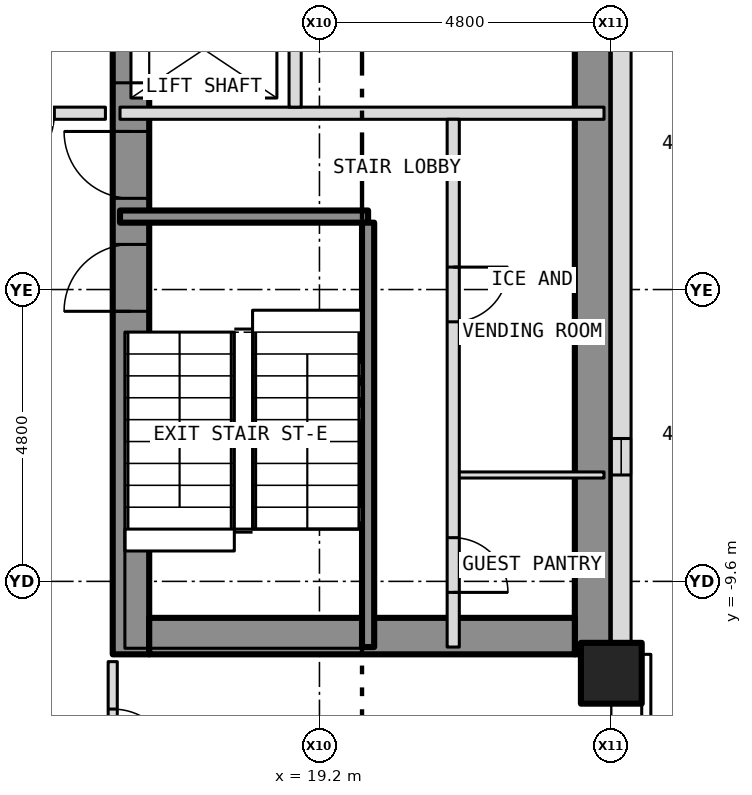
"""IFC4 building model, lengths in metres.
Left out: names, types, materials, properties, quantities, classifications, styles, units other than length and angle.
Written with IfcOpenShell. Run it as: python <this file> out.ifc"""

import sys

from ifc_helpers import new_model, si_unit, direction, frame, frame_2d, origin, origin_2d, place, context, subcontext, project, spatial, rectangle, hollow_rectangle, extrude, element, fill, save


model = new_model("IFC4")
c1 = context("Model", 3, precision=1e-05, world=origin(), true_north=direction((0.0, 1.0)))
c2 = subcontext(c1, "Body", "Model", "MODEL_VIEW")
j1 = project(units=[si_unit("LENGTHUNIT", "METRE"), si_unit("PLANEANGLEUNIT", "RADIAN")], contexts=[c1])
p1 = place(None, origin())
s1 = spatial("IfcSite", under=j1, at=p1, CompositionType="ELEMENT")
p2 = place(p1, origin())
s2 = spatial("IfcBuilding", under=s1, at=p2, CompositionType="ELEMENT")
p3 = place(p2, frame((0.0, 0.0, 42.5)))
s3 = spatial("IfcBuildingStorey", under=s2, at=p3, CompositionType="ELEMENT", Elevation=42.5)
p4 = place(p3, frame((24.0, -11.111, -0.15), z_axis=(0.0, 0.0, 1.0), x_axis=(1.0, 0.0, 0.0)))
e1 = element("IfcColumn", 1, at=p4, inside=s3, PredefinedType="COLUMN", context=c2, shape_type="SweptSolid", body=[
    extrude(hollow_rectangle(XDim=1.0, YDim=1.0, WallThickness=0.06, at=origin_2d()), origin(), (0.0, 0.0, 1.0), 3.5),
])
p5 = place(p3, frame((16.1, -10.8, 0.0), z_axis=(0.0, 0.0, 1.0), x_axis=(0.0, 1.0, 0.0)))
e2 = element("IfcWall", 2, at=p5, inside=s3, PredefinedType="SHEAR", context=c2, shape_type="SweptSolid", body=[
    extrude(rectangle(XDim=21.6, YDim=0.6, at=frame_2d((10.8, 0.0))), origin(), (0.0, 0.0, 1.0), 3.25),
])
p6 = place(p5, frame((9.4, 0.0, 0.0)))
e3 = element("IfcOpeningElement", 3, at=p6, cuts=e2, PredefinedType="OPENING", context=c2, shape_type="SweptSolid", body=[
    extrude(rectangle(XDim=1.1, YDim=2.1, at=frame_2d((0.55, 1.05))), frame((0.0, 0.312, 0.0), z_axis=(0.0, -1.0, 0.0), x_axis=(1.0, 0.0, 0.0)), (0.0, 0.0, 1.0), 0.624),
])
p7 = place(p5, frame((11.5, 0.0, 0.0)))
e4 = element("IfcOpeningElement", 4, at=p7, cuts=e2, PredefinedType="OPENING", context=c2, shape_type="SweptSolid", body=[
    extrude(rectangle(XDim=1.1, YDim=2.1, at=frame_2d((0.55, 1.05))), frame((0.0, 0.312, 0.0), z_axis=(0.0, -1.0, 0.0), x_axis=(1.0, 0.0, 0.0)), (0.0, 0.0, 1.0), 0.624),
])
p8 = place(p5, frame((13.6, 0.0, 0.0)))
e5 = element("IfcOpeningElement", 5, at=p8, cuts=e2, PredefinedType="OPENING", context=c2, shape_type="SweptSolid", body=[
    extrude(rectangle(XDim=1.1, YDim=2.1, at=frame_2d((0.55, 1.05))), frame((0.0, 0.312, 0.0), z_axis=(0.0, -1.0, 0.0), x_axis=(1.0, 0.0, 0.0)), (0.0, 0.0, 1.0), 0.624),
])
p9 = place(p5, frame((15.7, 0.0, 0.0)))
e6 = element("IfcOpeningElement", 6, at=p9, cuts=e2, PredefinedType="OPENING", context=c2, shape_type="SweptSolid", body=[
    extrude(rectangle(XDim=1.1, YDim=2.1, at=frame_2d((0.55, 1.05))), frame((0.0, 0.312, 0.0), z_axis=(0.0, -1.0, 0.0), x_axis=(1.0, 0.0, 0.0)), (0.0, 0.0, 1.0), 0.624),
])
p10 = place(p5, frame((17.8, 0.0, 0.0)))
e7 = element("IfcOpeningElement", 7, at=p10, cuts=e2, PredefinedType="OPENING", context=c2, shape_type="SweptSolid", body=[
    extrude(rectangle(XDim=1.1, YDim=2.1, at=frame_2d((0.55, 1.05))), frame((0.0, 0.312, 0.0), z_axis=(0.0, -1.0, 0.0), x_axis=(1.0, 0.0, 0.0)), (0.0, 0.0, 1.0), 0.624),
])
p11 = place(p5, frame((5.642, 0.0, 0.0)))
e8 = element("IfcOpeningElement", 8, at=p11, cuts=e2, PredefinedType="OPENING", context=c2, shape_type="SweptSolid", body=[
    extrude(rectangle(XDim=1.1, YDim=2.1, at=frame_2d((0.55, 1.05))), frame((0.0, 0.312, 0.0), z_axis=(0.0, -1.0, 0.0), x_axis=(1.0, 0.0, 0.0)), (0.0, 0.0, 1.0), 0.624),
])
p12 = place(p5, frame((7.5, 0.0, 0.0)))
e9 = element("IfcOpeningElement", 9, at=p12, cuts=e2, PredefinedType="OPENING", context=c2, shape_type="SweptSolid", body=[
    extrude(rectangle(XDim=1.1, YDim=2.1, at=frame_2d((0.55, 1.05))), frame((0.0, 0.312, 0.0), z_axis=(0.0, -1.0, 0.0), x_axis=(1.0, 0.0, 0.0)), (0.0, 0.0, 1.0), 0.624),
])
p13 = place(p3, frame((23.7, -10.8, 0.0), z_axis=(0.0, 0.0, 1.0), x_axis=(0.0, 1.0, 0.0)))
e10 = element("IfcWall", 10, at=p13, inside=s3, PredefinedType="SHEAR", context=c2, shape_type="SweptSolid", body=[
    extrude(rectangle(XDim=21.6, YDim=0.6, at=frame_2d((10.8, 0.0))), origin(), (0.0, 0.0, 1.0), 3.25),
])
p14 = place(p3, frame((16.4, -10.5, 0.0), z_axis=(0.0, 0.0, 1.0), x_axis=(1.0, 0.0, 0.0)))
e11 = element("IfcWall", 11, at=p14, inside=s3, PredefinedType="SHEAR", context=c2, shape_type="SweptSolid", body=[
    extrude(rectangle(XDim=7.0, YDim=0.6, at=frame_2d((3.5, 0.0))), origin(), (0.0, 0.0, 1.0), 3.25),
])
p15 = place(p3, frame((24.163, -10.8, 0.0), z_axis=(0.0, 0.0, 1.0), x_axis=(0.0, 1.0, 0.0)))
e12 = element("IfcWall", 12, at=p15, inside=s3, PredefinedType="SOLIDWALL", context=c2, shape_type="SweptSolid", body=[
    extrude(rectangle(XDim=21.6, YDim=0.325, at=frame_2d((10.8, 0.0))), origin(), (0.0, 0.0, 1.0), 3.5),
])
p16 = place(p15, frame((2.95, 0.0, 1.0)))
e13 = element("IfcOpeningElement", 13, at=p16, cuts=e12, PredefinedType="OPENING", context=c2, shape_type="SweptSolid", body=[
    extrude(rectangle(XDim=0.6, YDim=1.5, at=frame_2d((0.3, 0.75))), frame((0.0, 0.175, 0.0), z_axis=(0.0, -1.0, 0.0), x_axis=(1.0, 0.0, 0.0)), (0.0, 0.0, 1.0), 0.349),
])
p17 = place(p3, frame((21.4, -7.85, 0.0), z_axis=(0.0, 0.0, 1.0), x_axis=(1.0, 0.0, 0.0)))
e14 = element("IfcWall", 14, at=p17, inside=s3, PredefinedType="PARTITIONING", context=c2, shape_type="SweptSolid", body=[
    extrude(rectangle(XDim=2.48, YDim=0.1, at=frame_2d((1.24, 0.0))), origin(), (0.0, 0.0, 1.0), 3.25),
])
p18 = place(p3, frame((15.92, -3.6, 0.0), z_axis=(0.0, 0.0, 1.0), x_axis=(1.0, 0.0, 0.0)))
e15 = element("IfcWall", 15, at=p18, inside=s3, PredefinedType="SHEAR", context=c2, shape_type="SweptSolid", body=[
    extrude(rectangle(XDim=4.08, YDim=0.2, at=frame_2d((2.04, 0.0))), origin(), (0.0, 0.0, 1.0), 3.25),
])
p19 = place(p3, frame((12.4, -1.9, 0.0), z_axis=(0.0, 0.0, 1.0), x_axis=(1.0, 0.0, 0.0)))
e16 = element("IfcWall", 16, at=p19, inside=s3, PredefinedType="PARTITIONING", context=c2, shape_type="SweptSolid", body=[
    extrude(rectangle(XDim=3.28, YDim=0.2, at=frame_2d((1.64, 0.0))), origin(), (0.0, 0.0, 1.0), 3.35),
])
p20 = place(p19, frame((1.34, 0.0, 0.0)))
e17 = element("IfcOpeningElement", 17, at=p20, cuts=e16, PredefinedType="OPENING", context=c2, shape_type="SweptSolid", body=[
    extrude(rectangle(XDim=1.1, YDim=2.1, at=frame_2d((0.55, 1.05))), frame((0.0, 0.112, 0.0), z_axis=(0.0, -1.0, 0.0), x_axis=(1.0, 0.0, 0.0)), (0.0, 0.0, 1.0), 0.224),
])
p21 = place(p3, frame((15.92, -1.9, 0.0), z_axis=(0.0, 0.0, 1.0), x_axis=(1.0, 0.0, 0.0)))
e18 = element("IfcWall", 18, at=p21, inside=s3, PredefinedType="PARTITIONING", context=c2, shape_type="SweptSolid", body=[
    extrude(rectangle(XDim=7.96, YDim=0.2, at=frame_2d((3.98, 0.0))), origin(), (0.0, 0.0, 1.0), 3.25),
])
p22 = place(p3, frame((15.8, -15.725, 0.0), z_axis=(0.0, 0.0, 1.0), x_axis=(0.0, 1.0, 0.0)))
e19 = element("IfcWall", 19, at=p22, inside=s3, PredefinedType="PARTITIONING", context=c2, shape_type="SweptSolid", body=[
    extrude(rectangle(XDim=4.805, YDim=0.15, at=frame_2d((2.403, 0.0))), origin(), (0.0, 0.0, 1.0), 3.35),
])
p23 = place(p22, frame((3.025, 0.0, 0.0)))
e20 = element("IfcOpeningElement", 20, at=p23, cuts=e19, PredefinedType="OPENING", context=c2, shape_type="SweptSolid", body=[
    extrude(rectangle(XDim=1.0, YDim=2.1, at=frame_2d((0.5, 1.05))), frame((0.0, 0.087, 0.0), z_axis=(0.0, -1.0, 0.0), x_axis=(1.0, 0.0, 0.0)), (0.0, 0.0, 1.0), 0.174),
])
p24 = place(p3, frame((18.8, -1.8, 0.0), z_axis=(0.0, 0.0, 1.0), x_axis=(0.0, 1.0, 0.0)))
e21 = element("IfcWall", 21, at=p24, inside=s3, PredefinedType="PARTITIONING", context=c2, shape_type="SweptSolid", body=[
    extrude(rectangle(XDim=12.48, YDim=0.2, at=frame_2d((6.24, 0.0))), origin(), (0.0, 0.0, 1.0), 3.25),
])
p25 = place(p3, frame((20.0, -10.68, 0.0), z_axis=(0.0, 0.0, 1.0), x_axis=(0.0, 1.0, 0.0)))
e22 = element("IfcWall", 22, at=p25, inside=s3, PredefinedType="SHEAR", context=c2, shape_type="SweptSolid", body=[
    extrude(rectangle(XDim=6.98, YDim=0.2, at=frame_2d((3.49, 0.0))), origin(), (0.0, 0.0, 1.0), 3.25),
])
p26 = place(p3, frame((21.4, -10.68, 0.0), z_axis=(0.0, 0.0, 1.0), x_axis=(0.0, 1.0, 0.0)))
e23 = element("IfcWall", 23, at=p26, inside=s3, PredefinedType="PARTITIONING", context=c2, shape_type="SweptSolid", body=[
    extrude(rectangle(XDim=8.68, YDim=0.2, at=frame_2d((4.34, 0.0))), origin(), (0.0, 0.0, 1.0), 3.25),
])
p27 = place(p26, frame((0.899, 0.0, 0.0)))
e24 = element("IfcOpeningElement", 24, at=p27, cuts=e23, PredefinedType="OPENING", context=c2, shape_type="SweptSolid", body=[
    extrude(rectangle(XDim=0.9, YDim=2.1, at=frame_2d((0.45, 1.05))), frame((0.0, 0.112, 0.0), z_axis=(0.0, -1.0, 0.0), x_axis=(1.0, 0.0, 0.0)), (0.0, 0.0, 1.0), 0.224),
])
p28 = place(p26, frame((5.349, 0.0, 0.0)))
e25 = element("IfcOpeningElement", 25, at=p28, cuts=e23, PredefinedType="OPENING", context=c2, shape_type="SweptSolid", body=[
    extrude(rectangle(XDim=0.9, YDim=2.1, at=frame_2d((0.45, 1.05))), frame((0.0, 0.112, 0.0), z_axis=(0.0, -1.0, 0.0), x_axis=(1.0, 0.0, 0.0)), (0.0, 0.0, 1.0), 0.224),
])
p29 = place(p16, origin())
e26 = element("IfcWindow", 26, at=p29, inside=s3, PartitioningType="SINGLE_PANEL", PredefinedType="WINDOW", context=c2, shape_type="SweptSolid", body=[
    extrude(rectangle(XDim=0.6, YDim=1.5, at=frame_2d((0.3, 0.75))), frame((0.0, -0.073, 0.0), z_axis=(0.0, -1.0, 0.0), x_axis=(1.0, 0.0, 0.0)), (0.0, 0.0, 1.0), 0.06),
])
fill(e13, e26)
p30 = place(p6, origin())
e27 = element("IfcDoor", 27, at=p30, inside=s3, OperationType="SLIDING_TO_LEFT", PredefinedType="DOOR", context=c2, shape_type="SweptSolid", body=[
    extrude(rectangle(XDim=1.1, YDim=2.1, at=frame_2d((0.55, 1.05))), frame((0.0, 0.025, 0.0), z_axis=(0.0, -1.0, 0.0), x_axis=(1.0, 0.0, 0.0)), (0.0, 0.0, 1.0), 0.05),
])
fill(e3, e27)
p31 = place(p11, origin())
e28 = element("IfcDoor", 28, at=p31, inside=s3, OperationType="SINGLE_SWING_LEFT", PredefinedType="DOOR", context=c2, shape_type="SweptSolid", body=[
    extrude(rectangle(XDim=1.1, YDim=2.1, at=frame_2d((0.55, 1.05))), frame((0.0, 0.025, 0.0), z_axis=(0.0, -1.0, 0.0), x_axis=(1.0, 0.0, 0.0)), (0.0, 0.0, 1.0), 0.05),
])
fill(e8, e28)
p32 = place(p12, origin())
e29 = element("IfcDoor", 29, at=p32, inside=s3, OperationType="SINGLE_SWING_RIGHT", PredefinedType="DOOR", context=c2, shape_type="SweptSolid", body=[
    extrude(rectangle(XDim=1.1, YDim=2.1, at=frame_2d((0.55, 1.05))), frame((0.0, 0.025, 0.0), z_axis=(0.0, -1.0, 0.0), x_axis=(1.0, 0.0, 0.0)), (0.0, 0.0, 1.0), 0.05),
])
fill(e9, e29)
p33 = place(p27, origin())
e30 = element("IfcDoor", 30, at=p33, inside=s3, OperationType="SINGLE_SWING_LEFT", PredefinedType="DOOR", context=c2, shape_type="SweptSolid", body=[
    extrude(rectangle(XDim=0.9, YDim=2.1, at=frame_2d((0.45, 1.05))), frame((0.0, 0.025, 0.0), z_axis=(0.0, -1.0, 0.0), x_axis=(1.0, 0.0, 0.0)), (0.0, 0.0, 1.0), 0.05),
])
fill(e24, e30)
p34 = place(p28, origin())
e31 = element("IfcDoor", 31, at=p34, inside=s3, OperationType="SINGLE_SWING_RIGHT", PredefinedType="DOOR", context=c2, shape_type="SweptSolid", body=[
    extrude(rectangle(XDim=0.9, YDim=2.1, at=frame_2d((0.45, 1.05))), frame((0.0, 0.025, 0.0), z_axis=(0.0, -1.0, 0.0), x_axis=(1.0, 0.0, 0.0)), (0.0, 0.0, 1.0), 0.05),
])
fill(e25, e31)
p35 = place(p20, origin())
e32 = element("IfcDoor", 32, at=p35, inside=s3, OperationType="SINGLE_SWING_LEFT", PredefinedType="DOOR", context=c2, shape_type="SweptSolid", body=[
    extrude(rectangle(XDim=1.1, YDim=2.1, at=frame_2d((0.55, 1.05))), frame((0.0, 0.025, 0.0), z_axis=(0.0, -1.0, 0.0), x_axis=(1.0, 0.0, 0.0)), (0.0, 0.0, 1.0), 0.05),
])
fill(e17, e32)
p36 = place(p23, origin())
e33 = element("IfcDoor", 33, at=p36, inside=s3, OperationType="SINGLE_SWING_LEFT", PredefinedType="DOOR", context=c2, shape_type="SweptSolid", body=[
    extrude(rectangle(XDim=1.0, YDim=2.1, at=frame_2d((0.5, 1.05))), frame((0.0, 0.025, 0.0), z_axis=(0.0, -1.0, 0.0), x_axis=(1.0, 0.0, 0.0)), (0.0, 0.0, 1.0), 0.05),
])
fill(e20, e33)
save(model, sys.argv[1])
